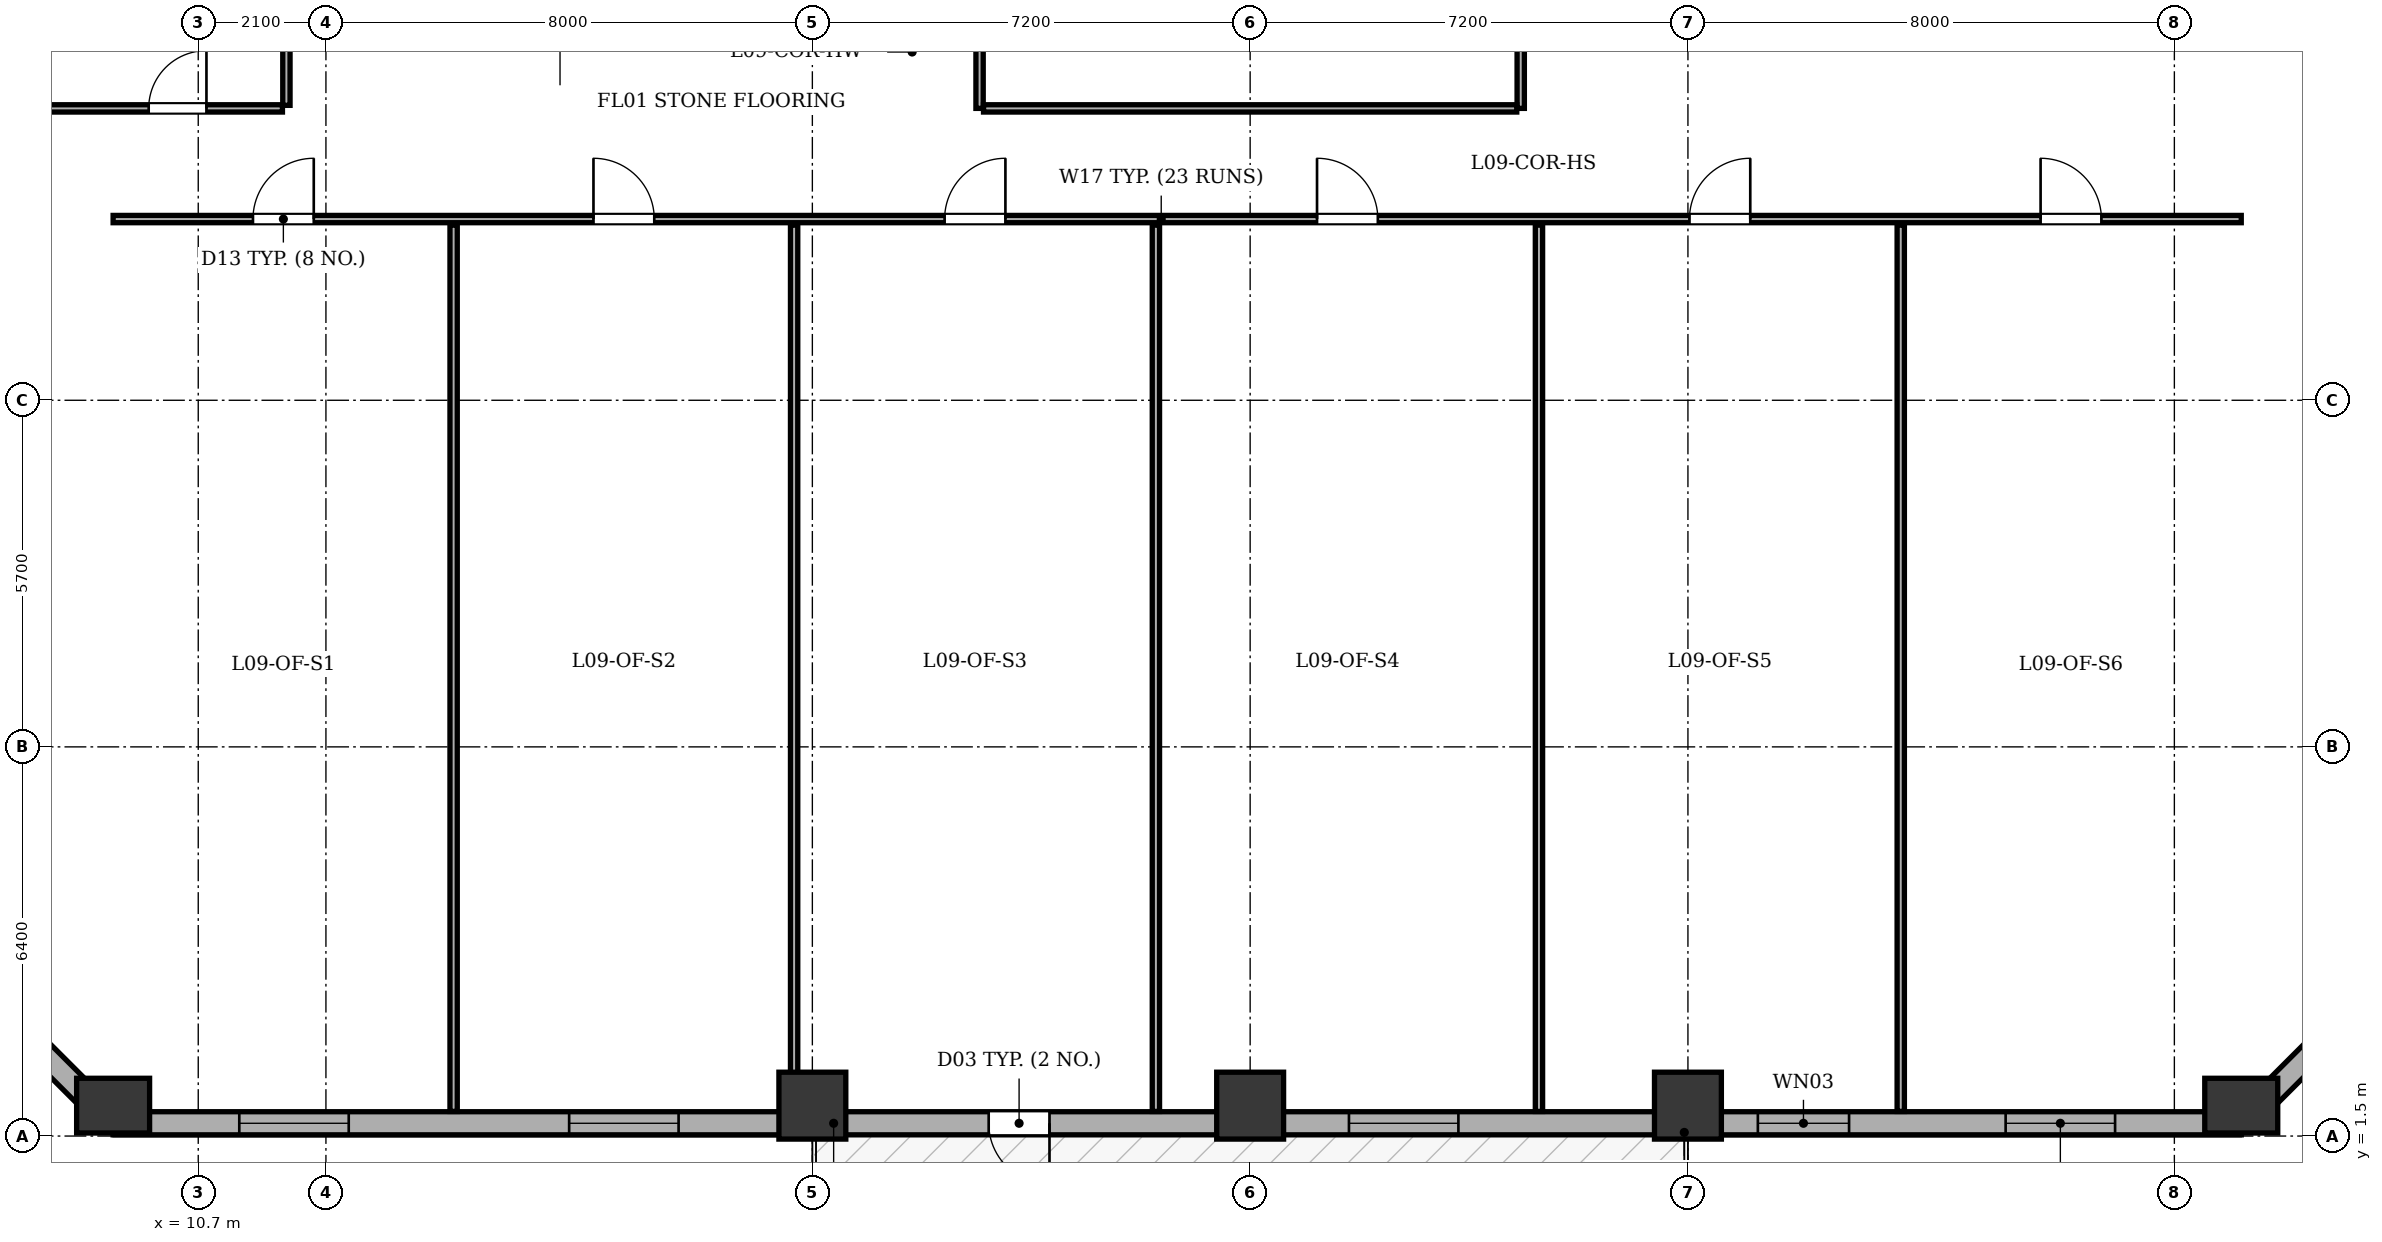
"""IFC4 building model, lengths in metres.
Left out: names, types, materials, properties, quantities, classifications, styles, units other than length and angle.
Written with IfcOpenShell. Run it as: python <this file> out.ifc"""

import sys

from ifc_helpers import new_model, si_unit, direction, frame, frame_2d, origin, origin_2d, place, context, subcontext, project, spatial, rectangle, extrude, element, fill, save


model = new_model("IFC4")
c1 = context("Model", 3, precision=1e-05, world=origin(), true_north=direction((0.0, 1.0)))
c2 = subcontext(c1, "Body", "Model", "MODEL_VIEW")
j1 = project(units=[si_unit("LENGTHUNIT", "METRE"), si_unit("PLANEANGLEUNIT", "RADIAN")], contexts=[c1])
p1 = place(None, origin())
s1 = spatial("IfcSite", under=j1, at=p1, CompositionType="ELEMENT")
p2 = place(p1, origin())
s2 = spatial("IfcBuilding", under=s1, at=p2, CompositionType="ELEMENT")
p3 = place(p2, frame((0.0, 0.0, 39.9)))
s3 = spatial("IfcBuildingStorey", under=s2, at=p3, CompositionType="ELEMENT", Elevation=39.9)
p4 = place(p3, frame((9.3, 2.0, 0.0), z_axis=(0.0, 0.0, 1.0), x_axis=(1.0, 0.0, 0.0)))
e1 = element("IfcColumn", 1, at=p4, inside=s3, PredefinedType="COLUMN", context=c2, shape_type="SweptSolid", body=[
    extrude(rectangle(XDim=0.9, YDim=1.2, at=origin_2d()), origin(), (0.0, 0.0, 1.0), 3.9),
])
for number, where, z_axis, x_axis in (
    (2, (20.8, 2.0, 0.0), (0.0, 0.0, 1.0), (1.0, 0.0, 0.0)),
    (3, (28.0, 2.0, 0.0), (0.0, 0.0, 1.0), (1.0, 0.0, 0.0)),
    (4, (35.2, 2.0, 0.0), (0.0, 0.0, 1.0), (1.0, 0.0, 0.0)),
):
    element("IfcColumn", number, at=place(p3, frame(where, z_axis=z_axis, x_axis=x_axis)), inside=s3, PredefinedType="COLUMN", context=c2, shape_type="SweptSolid", body=[
        extrude(rectangle(XDim=1.1, YDim=1.1, at=origin_2d()), origin(), (0.0, 0.0, 1.0), 3.9),
    ])
p5 = place(p3, frame((44.3, 2.0, 0.0), z_axis=(0.0, 0.0, 1.0), x_axis=(1.0, 0.0, 0.0)))
e5 = element("IfcColumn", 5, at=p5, inside=s3, PredefinedType="COLUMN", context=c2, shape_type="SweptSolid", body=[
    extrude(rectangle(XDim=0.9, YDim=1.2, at=origin_2d()), origin(), (0.0, 0.0, 1.0), 3.9),
])
p6 = place(p3, frame((44.3, 1.71, 0.0), z_axis=(0.0, 0.0, 1.0), x_axis=(-1.0, 0.0, 0.0)))
e6 = element("IfcWall", 6, at=p6, inside=s3, PredefinedType="STANDARD", context=c2, shape_type="SweptSolid", body=[
    extrude(rectangle(XDim=35.0, YDim=0.38, at=frame_2d((17.5, 0.0))), origin(), (0.0, 0.0, 1.0), 3.135),
])
p7 = place(p6, frame((19.6, 0.0, 0.0)))
e7 = element("IfcOpeningElement", 7, at=p7, cuts=e6, PredefinedType="OPENING", context=c2, shape_type="SweptSolid", body=[
    extrude(rectangle(XDim=1.0, YDim=2.02, at=frame_2d((0.5, 1.01))), frame((0.0, 0.2, 0.0), z_axis=(0.0, -1.0, 0.0), x_axis=(1.0, 0.0, 0.0)), (0.0, 0.0, 1.0), 0.4),
])
p8 = place(p6, frame((2.075, 0.0, 0.8)))
e8 = element("IfcOpeningElement", 8, at=p8, cuts=e6, PredefinedType="OPENING", context=c2, shape_type="SweptSolid", body=[
    extrude(rectangle(XDim=1.8, YDim=1.9, at=frame_2d((0.9, 0.95))), frame((0.0, 0.2, 0.0), z_axis=(0.0, -1.0, 0.0), x_axis=(1.0, 0.0, 0.0)), (0.0, 0.0, 1.0), 0.4),
])
p9 = place(p6, frame((6.45, 0.0, 0.8)))
e9 = element("IfcOpeningElement", 9, at=p9, cuts=e6, PredefinedType="OPENING", context=c2, shape_type="SweptSolid", body=[
    extrude(rectangle(XDim=1.5, YDim=1.9, at=frame_2d((0.75, 0.95))), frame((0.0, 0.2, 0.0), z_axis=(0.0, -1.0, 0.0), x_axis=(1.0, 0.0, 0.0)), (0.0, 0.0, 1.0), 0.4),
])
p10 = place(p6, frame((12.875, 0.0, 0.8)))
e10 = element("IfcOpeningElement", 10, at=p10, cuts=e6, PredefinedType="OPENING", context=c2, shape_type="SweptSolid", body=[
    extrude(rectangle(XDim=1.8, YDim=1.9, at=frame_2d((0.9, 0.95))), frame((0.0, 0.2, 0.0), z_axis=(0.0, -1.0, 0.0), x_axis=(1.0, 0.0, 0.0)), (0.0, 0.0, 1.0), 0.4),
])
p11 = place(p6, frame((25.7, 0.0, 0.8)))
e11 = element("IfcOpeningElement", 11, at=p11, cuts=e6, PredefinedType="OPENING", context=c2, shape_type="SweptSolid", body=[
    extrude(rectangle(XDim=1.8, YDim=1.9, at=frame_2d((0.9, 0.95))), frame((0.0, 0.2, 0.0), z_axis=(0.0, -1.0, 0.0), x_axis=(1.0, 0.0, 0.0)), (0.0, 0.0, 1.0), 0.4),
])
p12 = place(p6, frame((31.125, 0.0, 0.8)))
e12 = element("IfcOpeningElement", 12, at=p12, cuts=e6, PredefinedType="OPENING", context=c2, shape_type="SweptSolid", body=[
    extrude(rectangle(XDim=1.8, YDim=1.9, at=frame_2d((0.9, 0.95))), frame((0.0, 0.2, 0.0), z_axis=(0.0, -1.0, 0.0), x_axis=(1.0, 0.0, 0.0)), (0.0, 0.0, 1.0), 0.4),
])
p13 = place(p3, frame((9.3, 1.71, 0.0), z_axis=(0.0, 0.0, 1.0), x_axis=(-0.707106781187, 0.707106781187, 0.0)))
e13 = element("IfcWall", 13, at=p13, inside=s3, PredefinedType="STANDARD", context=c2, shape_type="SweptSolid", body=[
    extrude(rectangle(XDim=6.774, YDim=0.38, at=frame_2d((3.387, 0.0))), origin(), (0.0, 0.0, 1.0), 3.135),
])
p14 = place(p13, frame((2.687, 0.0, 0.8)))
e14 = element("IfcOpeningElement", 14, at=p14, cuts=e13, PredefinedType="OPENING", context=c2, shape_type="SweptSolid", body=[
    extrude(rectangle(XDim=1.4, YDim=1.65, at=frame_2d((0.7, 0.825))), frame((0.0, 0.2, 0.0), z_axis=(0.0, -1.0, 0.0), x_axis=(1.0, 0.0, 0.0)), (0.0, 0.0, 1.0), 0.4),
])
p15 = place(p3, frame((49.09, 6.5, 0.0), z_axis=(0.0, 0.0, 1.0), x_axis=(-0.707106781187, -0.707106781187, 0.0)))
e15 = element("IfcWall", 15, at=p15, inside=s3, PredefinedType="STANDARD", context=c2, shape_type="SweptSolid", body=[
    extrude(rectangle(XDim=6.774, YDim=0.38, at=frame_2d((3.387, 0.0))), origin(), (0.0, 0.0, 1.0), 3.135),
])
p16 = place(p15, frame((2.687, 0.0, 0.8)))
e16 = element("IfcOpeningElement", 16, at=p16, cuts=e15, PredefinedType="OPENING", context=c2, shape_type="SweptSolid", body=[
    extrude(rectangle(XDim=1.4, YDim=1.65, at=frame_2d((0.7, 0.825))), frame((0.0, 0.2, 0.0), z_axis=(0.0, -1.0, 0.0), x_axis=(1.0, 0.0, 0.0)), (0.0, 0.0, 1.0), 0.4),
])
for number, where, z_axis, x_axis in (
    (17, (23.55, 18.4, 0.0), (0.0, 0.0, 1.0), (0.0, 1.0, 0.0)),
    (18, (32.45, 18.4, 0.0), (0.0, 0.0, 1.0), (0.0, 1.0, 0.0)),
):
    element("IfcWall", number, at=place(p3, frame(where, z_axis=z_axis, x_axis=x_axis)), inside=s3, PredefinedType="PARTITIONING", context=c2, shape_type="SweptSolid", body=[
        extrude(rectangle(XDim=3.485, YDim=0.12, at=frame_2d((1.743, 0.0))), origin(), (0.0, 0.0, 1.0), 3.6),
    ])
p17 = place(p3, frame((23.615, 18.4, 0.0), z_axis=(0.0, 0.0, 1.0), x_axis=(1.0, 0.0, 0.0)))
e19 = element("IfcWall", 19, at=p17, inside=s3, PredefinedType="PARTITIONING", context=c2, shape_type="SweptSolid", body=[
    extrude(rectangle(XDim=8.77, YDim=0.12, at=frame_2d((4.385, 0.0))), origin(), (0.0, 0.0, 1.0), 3.6),
])
p18 = place(p3, frame((9.3, 16.58, 0.0), z_axis=(0.0, 0.0, 1.0), x_axis=(1.0, 0.0, 0.0)))
e20 = element("IfcWall", 20, at=p18, inside=s3, PredefinedType="PARTITIONING", context=c2, shape_type="SweptSolid", body=[
    extrude(rectangle(XDim=35.0, YDim=0.12, at=frame_2d((17.5, 0.0))), origin(), (0.0, 0.0, 1.0), 3.6),
])
p19 = place(p18, frame((2.3, 0.0, 0.0)))
e21 = element("IfcOpeningElement", 21, at=p19, cuts=e20, PredefinedType="OPENING", context=c2, shape_type="SweptSolid", body=[
    extrude(rectangle(XDim=1.0, YDim=2.1, at=frame_2d((0.5, 1.05))), frame((0.0, 0.07, 0.0), z_axis=(0.0, -1.0, 0.0), x_axis=(1.0, 0.0, 0.0)), (0.0, 0.0, 1.0), 0.14),
])
p20 = place(p18, frame((7.9, 0.0, 0.0)))
e22 = element("IfcOpeningElement", 22, at=p20, cuts=e20, PredefinedType="OPENING", context=c2, shape_type="SweptSolid", body=[
    extrude(rectangle(XDim=1.0, YDim=2.1, at=frame_2d((0.5, 1.05))), frame((0.0, 0.07, 0.0), z_axis=(0.0, -1.0, 0.0), x_axis=(1.0, 0.0, 0.0)), (0.0, 0.0, 1.0), 0.14),
])
p21 = place(p18, frame((13.675, 0.0, 0.0)))
e23 = element("IfcOpeningElement", 23, at=p21, cuts=e20, PredefinedType="OPENING", context=c2, shape_type="SweptSolid", body=[
    extrude(rectangle(XDim=1.0, YDim=2.1, at=frame_2d((0.5, 1.05))), frame((0.0, 0.07, 0.0), z_axis=(0.0, -1.0, 0.0), x_axis=(1.0, 0.0, 0.0)), (0.0, 0.0, 1.0), 0.14),
])
p22 = place(p18, frame((19.8, 0.0, 0.0)))
e24 = element("IfcOpeningElement", 24, at=p22, cuts=e20, PredefinedType="OPENING", context=c2, shape_type="SweptSolid", body=[
    extrude(rectangle(XDim=1.0, YDim=2.1, at=frame_2d((0.5, 1.05))), frame((0.0, 0.07, 0.0), z_axis=(0.0, -1.0, 0.0), x_axis=(1.0, 0.0, 0.0)), (0.0, 0.0, 1.0), 0.14),
])
p23 = place(p18, frame((25.925, 0.0, 0.0)))
e25 = element("IfcOpeningElement", 25, at=p23, cuts=e20, PredefinedType="OPENING", context=c2, shape_type="SweptSolid", body=[
    extrude(rectangle(XDim=1.0, YDim=2.1, at=frame_2d((0.5, 1.05))), frame((0.0, 0.07, 0.0), z_axis=(0.0, -1.0, 0.0), x_axis=(1.0, 0.0, 0.0)), (0.0, 0.0, 1.0), 0.14),
])
p24 = place(p18, frame((31.7, 0.0, 0.0)))
e26 = element("IfcOpeningElement", 26, at=p24, cuts=e20, PredefinedType="OPENING", context=c2, shape_type="SweptSolid", body=[
    extrude(rectangle(XDim=1.0, YDim=2.1, at=frame_2d((0.5, 1.05))), frame((0.0, 0.07, 0.0), z_axis=(0.0, -1.0, 0.0), x_axis=(1.0, 0.0, 0.0)), (0.0, 0.0, 1.0), 0.14),
])
p25 = place(p3, frame((14.9, 1.905, 0.0), z_axis=(0.0, 0.0, 1.0), x_axis=(0.0, 1.0, 0.0)))
e27 = element("IfcWall", 27, at=p25, inside=s3, PredefinedType="PARTITIONING", context=c2, shape_type="SweptSolid", body=[
    extrude(rectangle(XDim=14.575, YDim=0.12, at=frame_2d((7.288, 0.0))), origin(), (0.0, 0.0, 1.0), 3.6),
])
p26 = place(p3, frame((20.5, 1.905, 0.0), z_axis=(0.0, 0.0, 1.0), x_axis=(0.0, 1.0, 0.0)))
e28 = element("IfcWall", 28, at=p26, inside=s3, PredefinedType="PARTITIONING", context=c2, shape_type="SweptSolid", body=[
    extrude(rectangle(XDim=14.575, YDim=0.12, at=frame_2d((7.288, 0.0))), origin(), (0.0, 0.0, 1.0), 2.835),
])
for number, where, z_axis, x_axis in (
    (29, (26.45, 1.905, 0.0), (0.0, 0.0, 1.0), (0.0, 1.0, 0.0)),
    (30, (32.75, 1.905, 0.0), (0.0, 0.0, 1.0), (0.0, 1.0, 0.0)),
    (31, (38.7, 1.905, 0.0), (0.0, 0.0, 1.0), (0.0, 1.0, 0.0)),
):
    element("IfcWall", number, at=place(p3, frame(where, z_axis=z_axis, x_axis=x_axis)), inside=s3, PredefinedType="PARTITIONING", context=c2, shape_type="SweptSolid", body=[
        extrude(rectangle(XDim=14.575, YDim=0.12, at=frame_2d((7.288, 0.0))), origin(), (0.0, 0.0, 1.0), 3.6),
    ])
p27 = place(p3, frame((12.15, 18.45, 0.0), z_axis=(0.0, 0.0, 1.0), x_axis=(0.0, 1.0, 0.0)))
e32 = element("IfcWall", 32, at=p27, inside=s3, PredefinedType="PARTITIONING", context=c2, shape_type="SweptSolid", body=[
    extrude(rectangle(XDim=17.5, YDim=0.12, at=frame_2d((8.75, 0.0))), origin(), (0.0, 0.0, 1.0), 3.6),
])
p28 = place(p3, frame((4.705, 18.4, 0.0), z_axis=(0.0, 0.0, 1.0), x_axis=(1.0, 0.0, 0.0)))
e33 = element("IfcWall", 33, at=p28, inside=s3, PredefinedType="PARTITIONING", context=c2, shape_type="SweptSolid", body=[
    extrude(rectangle(XDim=7.38, YDim=0.12, at=frame_2d((3.69, 0.0))), origin(), (0.0, 0.0, 1.0), 3.6),
])
p29 = place(p28, frame((5.18, 0.0, 0.0)))
e34 = element("IfcOpeningElement", 34, at=p29, cuts=e33, PredefinedType="OPENING", context=c2, shape_type="SweptSolid", body=[
    extrude(rectangle(XDim=0.95, YDim=2.1, at=frame_2d((0.475, 1.05))), frame((0.0, 0.07, 0.0), z_axis=(0.0, -1.0, 0.0), x_axis=(1.0, 0.0, 0.0)), (0.0, 0.0, 1.0), 0.14),
])
p30 = place(p7, origin())
e35 = element("IfcDoor", 35, at=p30, inside=s3, OperationType="SINGLE_SWING_LEFT", PredefinedType="DOOR", context=c2, shape_type="SweptSolid", body=[
    extrude(rectangle(XDim=1.0, YDim=2.02, at=frame_2d((0.5, 1.01))), frame((0.0, 0.025, 0.0), z_axis=(0.0, -1.0, 0.0), x_axis=(1.0, 0.0, 0.0)), (0.0, 0.0, 1.0), 0.05),
])
fill(e7, e35)
p31 = place(p8, origin())
e36 = element("IfcWindow", 36, at=p31, inside=s3, PartitioningType="SINGLE_PANEL", PredefinedType="WINDOW", context=c2, shape_type="SweptSolid", body=[
    extrude(rectangle(XDim=1.8, YDim=1.9, at=frame_2d((0.9, 0.95))), frame((0.0, -0.01, 0.0), z_axis=(0.0, -1.0, 0.0), x_axis=(1.0, 0.0, 0.0)), (0.0, 0.0, 1.0), 0.06),
])
fill(e8, e36)
p32 = place(p9, origin())
e37 = element("IfcWindow", 37, at=p32, inside=s3, PartitioningType="SINGLE_PANEL", PredefinedType="WINDOW", context=c2, shape_type="SweptSolid", body=[
    extrude(rectangle(XDim=1.5, YDim=1.9, at=frame_2d((0.75, 0.95))), frame((0.0, -0.01, 0.0), z_axis=(0.0, -1.0, 0.0), x_axis=(1.0, 0.0, 0.0)), (0.0, 0.0, 1.0), 0.06),
])
fill(e9, e37)
p33 = place(p10, origin())
e38 = element("IfcWindow", 38, at=p33, inside=s3, PartitioningType="SINGLE_PANEL", PredefinedType="WINDOW", context=c2, shape_type="SweptSolid", body=[
    extrude(rectangle(XDim=1.8, YDim=1.9, at=frame_2d((0.9, 0.95))), frame((0.0, -0.01, 0.0), z_axis=(0.0, -1.0, 0.0), x_axis=(1.0, 0.0, 0.0)), (0.0, 0.0, 1.0), 0.06),
])
fill(e10, e38)
p34 = place(p11, origin())
e39 = element("IfcWindow", 39, at=p34, inside=s3, PartitioningType="SINGLE_PANEL", PredefinedType="WINDOW", context=c2, shape_type="SweptSolid", body=[
    extrude(rectangle(XDim=1.8, YDim=1.9, at=frame_2d((0.9, 0.95))), frame((0.0, -0.01, 0.0), z_axis=(0.0, -1.0, 0.0), x_axis=(1.0, 0.0, 0.0)), (0.0, 0.0, 1.0), 0.06),
])
fill(e11, e39)
p35 = place(p12, origin())
e40 = element("IfcWindow", 40, at=p35, inside=s3, PartitioningType="SINGLE_PANEL", PredefinedType="WINDOW", context=c2, shape_type="SweptSolid", body=[
    extrude(rectangle(XDim=1.8, YDim=1.9, at=frame_2d((0.9, 0.95))), frame((0.0, -0.01, 0.0), z_axis=(0.0, -1.0, 0.0), x_axis=(1.0, 0.0, 0.0)), (0.0, 0.0, 1.0), 0.06),
])
fill(e12, e40)
p36 = place(p19, origin())
e41 = element("IfcDoor", 41, at=p36, inside=s3, OperationType="SINGLE_SWING_RIGHT", PredefinedType="DOOR", context=c2, shape_type="SweptSolid", body=[
    extrude(rectangle(XDim=1.0, YDim=2.1, at=frame_2d((0.5, 1.05))), frame((0.0, 0.025, 0.0), z_axis=(0.0, -1.0, 0.0), x_axis=(1.0, 0.0, 0.0)), (0.0, 0.0, 1.0), 0.05),
])
fill(e21, e41)
p37 = place(p20, origin())
e42 = element("IfcDoor", 42, at=p37, inside=s3, OperationType="SINGLE_SWING_LEFT", PredefinedType="DOOR", context=c2, shape_type="SweptSolid", body=[
    extrude(rectangle(XDim=1.0, YDim=2.1, at=frame_2d((0.5, 1.05))), frame((0.0, 0.025, 0.0), z_axis=(0.0, -1.0, 0.0), x_axis=(1.0, 0.0, 0.0)), (0.0, 0.0, 1.0), 0.05),
])
fill(e22, e42)
p38 = place(p21, origin())
e43 = element("IfcDoor", 43, at=p38, inside=s3, OperationType="SINGLE_SWING_RIGHT", PredefinedType="DOOR", context=c2, shape_type="SweptSolid", body=[
    extrude(rectangle(XDim=1.0, YDim=2.1, at=frame_2d((0.5, 1.05))), frame((0.0, 0.025, 0.0), z_axis=(0.0, -1.0, 0.0), x_axis=(1.0, 0.0, 0.0)), (0.0, 0.0, 1.0), 0.05),
])
fill(e23, e43)
p39 = place(p22, origin())
e44 = element("IfcDoor", 44, at=p39, inside=s3, OperationType="SINGLE_SWING_LEFT", PredefinedType="DOOR", context=c2, shape_type="SweptSolid", body=[
    extrude(rectangle(XDim=1.0, YDim=2.1, at=frame_2d((0.5, 1.05))), frame((0.0, 0.025, 0.0), z_axis=(0.0, -1.0, 0.0), x_axis=(1.0, 0.0, 0.0)), (0.0, 0.0, 1.0), 0.05),
])
fill(e24, e44)
p40 = place(p23, origin())
e45 = element("IfcDoor", 45, at=p40, inside=s3, OperationType="SINGLE_SWING_RIGHT", PredefinedType="DOOR", context=c2, shape_type="SweptSolid", body=[
    extrude(rectangle(XDim=1.0, YDim=2.1, at=frame_2d((0.5, 1.05))), frame((0.0, 0.025, 0.0), z_axis=(0.0, -1.0, 0.0), x_axis=(1.0, 0.0, 0.0)), (0.0, 0.0, 1.0), 0.05),
])
fill(e25, e45)
p41 = place(p24, origin())
e46 = element("IfcDoor", 46, at=p41, inside=s3, OperationType="SINGLE_SWING_LEFT", PredefinedType="DOOR", context=c2, shape_type="SweptSolid", body=[
    extrude(rectangle(XDim=1.0, YDim=2.1, at=frame_2d((0.5, 1.05))), frame((0.0, 0.025, 0.0), z_axis=(0.0, -1.0, 0.0), x_axis=(1.0, 0.0, 0.0)), (0.0, 0.0, 1.0), 0.05),
])
fill(e26, e46)
p42 = place(p29, origin())
e47 = element("IfcDoor", 47, at=p42, inside=s3, OperationType="SINGLE_SWING_RIGHT", PredefinedType="DOOR", context=c2, shape_type="SweptSolid", body=[
    extrude(rectangle(XDim=0.95, YDim=2.1, at=frame_2d((0.475, 1.05))), frame((0.0, 0.025, 0.0), z_axis=(0.0, -1.0, 0.0), x_axis=(1.0, 0.0, 0.0)), (0.0, 0.0, 1.0), 0.05),
])
fill(e34, e47)
save(model, sys.argv[1])
